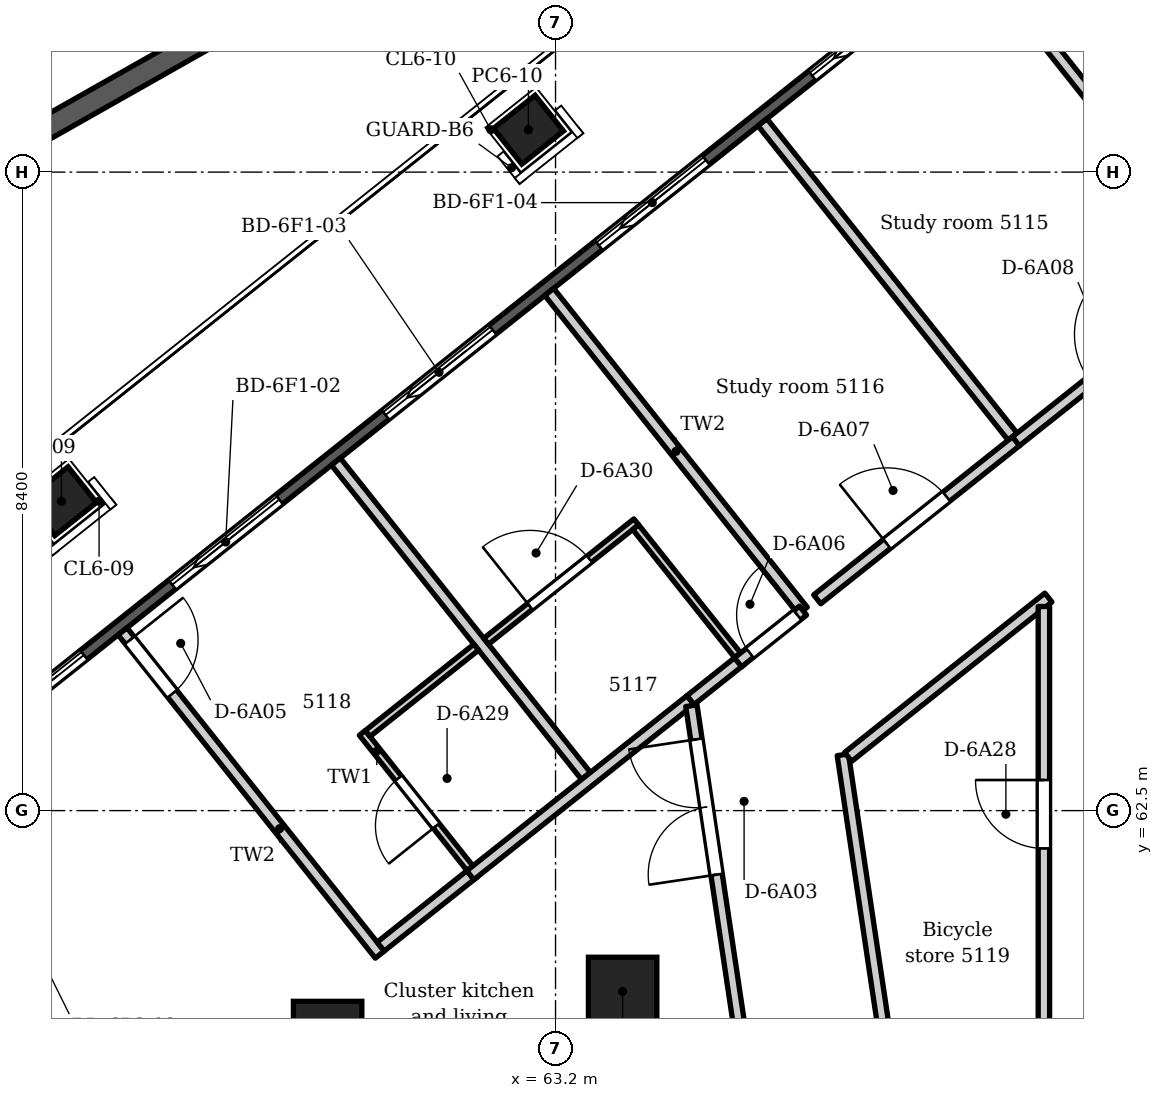
"""IFC4 building model, lengths in metres.
Left out: names, types, materials, properties, quantities, classifications, styles, units other than length and angle.
Written with IfcOpenShell. Run it as: python <this file> out.ifc"""

import sys

from ifc_helpers import new_model, si_unit, direction, frame, frame_2d, origin, origin_2d, place, context, subcontext, project, spatial, polyline, rectangle, circle, outline, extrude, element, fill, save


model = new_model("IFC4")
c1 = context("Model", 3, precision=1e-05, world=origin(), true_north=direction((0.0, 1.0)))
c2 = subcontext(c1, "Body", "Model", "MODEL_VIEW")
j1 = project(units=[si_unit("LENGTHUNIT", "METRE"), si_unit("PLANEANGLEUNIT", "RADIAN")], contexts=[c1])
p1 = place(None, origin())
s1 = spatial("IfcSite", under=j1, at=p1, CompositionType="ELEMENT")
p2 = place(p1, origin())
s2 = spatial("IfcBuilding", under=s1, at=p2, CompositionType="ELEMENT")
p3 = place(p2, frame((0.0, 0.0, 198.0)))
s3 = spatial("IfcBuildingStorey", under=s2, at=p3, CompositionType="ELEMENT", Elevation=198.0)
for number, where, z_axis, x_axis in (
    (1, (56.699, 66.571, -0.35), (0.0, 0.0, 1.0), (0.783, 0.623, 0.0)),
    (2, (62.844, 71.458, -0.35), (0.0, 0.0, 1.0), (0.783, 0.623, 0.0)),
):
    element("IfcColumn", number, at=place(p3, frame(where, z_axis=z_axis, x_axis=x_axis)), inside=s3, PredefinedType="COLUMN", context=c2, shape_type="SweptSolid", body=[
        extrude(rectangle(XDim=0.7, YDim=0.6, at=origin_2d()), origin(), (0.0, 0.0, 1.0), 3.95),
    ])
for number, where, z_axis, x_axis in (
    (3, (64.083, 60.121, -0.35), (0.0, 0.0, 1.0), (1.0, 0.0, 0.0)),
    (4, (60.202, 59.541, -0.35), (0.0, 0.0, 1.0), (1.0, 0.0, 0.0)),
):
    element("IfcColumn", number, at=place(p3, frame(where, z_axis=z_axis, x_axis=x_axis)), inside=s3, PredefinedType="COLUMN", context=c2, shape_type="SweptSolid", body=[
        extrude(circle(Radius=0.45, at=origin_2d()), origin(), (0.0, 0.0, 1.0), 3.95),
    ])
p4 = place(p3, frame((54.651, 62.686, 0.0), z_axis=(0.0, 0.0, 1.0), x_axis=(0.782609620341, 0.622512796776, 0.0)))
e5 = element("IfcWall", 5, at=p4, inside=s3, PredefinedType="SOLIDWALL", context=c2, shape_type="SweptSolid", body=[
    extrude(outline(polyline([(0.149, 0.075), (0.149, -0.075), (39.297, -0.075), (39.297, 0.075), (0.149, 0.075)])), origin(), (0.0, 0.0, 1.0), 3.3),
])
p5 = place(p4, frame((1.193, 0.0, 0.0)))
e6 = element("IfcOpeningElement", 6, at=p5, cuts=e5, PredefinedType="OPENING", context=c2, shape_type="SweptSolid", body=[
    extrude(rectangle(XDim=1.8, YDim=2.6, at=frame_2d((0.9, 1.3))), frame((0.0, 0.085, 0.0), z_axis=(0.0, -1.0, 0.0), x_axis=(1.0, 0.0, 0.0)), (0.0, 0.0, 1.0), 0.17),
])
p6 = place(p4, frame((4.479, 0.0, 0.0)))
e7 = element("IfcOpeningElement", 7, at=p6, cuts=e5, PredefinedType="OPENING", context=c2, shape_type="SweptSolid", body=[
    extrude(rectangle(XDim=1.8, YDim=2.6, at=frame_2d((0.9, 1.3))), frame((0.0, 0.085, 0.0), z_axis=(0.0, -1.0, 0.0), x_axis=(1.0, 0.0, 0.0)), (0.0, 0.0, 1.0), 0.17),
])
p7 = place(p4, frame((8.065, 0.0, 0.0)))
e8 = element("IfcOpeningElement", 8, at=p7, cuts=e5, PredefinedType="OPENING", context=c2, shape_type="SweptSolid", body=[
    extrude(rectangle(XDim=1.8, YDim=2.6, at=frame_2d((0.9, 1.3))), frame((0.0, 0.085, 0.0), z_axis=(0.0, -1.0, 0.0), x_axis=(1.0, 0.0, 0.0)), (0.0, 0.0, 1.0), 0.17),
])
p8 = place(p4, frame((11.651, 0.0, 0.0)))
e9 = element("IfcOpeningElement", 9, at=p8, cuts=e5, PredefinedType="OPENING", context=c2, shape_type="SweptSolid", body=[
    extrude(rectangle(XDim=1.8, YDim=2.6, at=frame_2d((0.9, 1.3))), frame((0.0, 0.085, 0.0), z_axis=(0.0, -1.0, 0.0), x_axis=(1.0, 0.0, 0.0)), (0.0, 0.0, 1.0), 0.17),
])
p9 = place(p4, frame((15.237, 0.0, 0.0)))
e10 = element("IfcOpeningElement", 10, at=p9, cuts=e5, PredefinedType="OPENING", context=c2, shape_type="SweptSolid", body=[
    extrude(rectangle(XDim=1.8, YDim=2.6, at=frame_2d((0.9, 1.3))), frame((0.0, 0.085, 0.0), z_axis=(0.0, -1.0, 0.0), x_axis=(1.0, 0.0, 0.0)), (0.0, 0.0, 1.0), 0.17),
])
p10 = place(p4, frame((18.823, 0.0, 0.0)))
e11 = element("IfcOpeningElement", 11, at=p10, cuts=e5, PredefinedType="OPENING", context=c2, shape_type="SweptSolid", body=[
    extrude(rectangle(XDim=1.8, YDim=2.6, at=frame_2d((0.9, 1.3))), frame((0.0, 0.085, 0.0), z_axis=(0.0, -1.0, 0.0), x_axis=(1.0, 0.0, 0.0)), (0.0, 0.0, 1.0), 0.17),
])
p11 = place(p4, frame((22.409, 0.0, 0.0)))
e12 = element("IfcOpeningElement", 12, at=p11, cuts=e5, PredefinedType="OPENING", context=c2, shape_type="SweptSolid", body=[
    extrude(rectangle(XDim=1.8, YDim=2.6, at=frame_2d((0.9, 1.3))), frame((0.0, 0.085, 0.0), z_axis=(0.0, -1.0, 0.0), x_axis=(1.0, 0.0, 0.0)), (0.0, 0.0, 1.0), 0.17),
])
p12 = place(p4, frame((25.995, 0.0, 0.0)))
e13 = element("IfcOpeningElement", 13, at=p12, cuts=e5, PredefinedType="OPENING", context=c2, shape_type="SweptSolid", body=[
    extrude(rectangle(XDim=1.8, YDim=2.6, at=frame_2d((0.9, 1.3))), frame((0.0, 0.085, 0.0), z_axis=(0.0, -1.0, 0.0), x_axis=(1.0, 0.0, 0.0)), (0.0, 0.0, 1.0), 0.17),
])
p13 = place(p4, frame((29.581, 0.0, 0.0)))
e14 = element("IfcOpeningElement", 14, at=p13, cuts=e5, PredefinedType="OPENING", context=c2, shape_type="SweptSolid", body=[
    extrude(rectangle(XDim=1.8, YDim=2.6, at=frame_2d((0.9, 1.3))), frame((0.0, 0.085, 0.0), z_axis=(0.0, -1.0, 0.0), x_axis=(1.0, 0.0, 0.0)), (0.0, 0.0, 1.0), 0.17),
])
p14 = place(p4, frame((33.167, 0.0, 0.0)))
e15 = element("IfcOpeningElement", 15, at=p14, cuts=e5, PredefinedType="OPENING", context=c2, shape_type="SweptSolid", body=[
    extrude(rectangle(XDim=1.8, YDim=2.6, at=frame_2d((0.9, 1.3))), frame((0.0, 0.085, 0.0), z_axis=(0.0, -1.0, 0.0), x_axis=(1.0, 0.0, 0.0)), (0.0, 0.0, 1.0), 0.17),
])
p15 = place(p4, frame((36.453, 0.0, 0.0)))
e16 = element("IfcOpeningElement", 16, at=p15, cuts=e5, PredefinedType="OPENING", context=c2, shape_type="SweptSolid", body=[
    extrude(rectangle(XDim=1.8, YDim=2.6, at=frame_2d((0.9, 1.3))), frame((0.0, 0.085, 0.0), z_axis=(0.0, -1.0, 0.0), x_axis=(1.0, 0.0, 0.0)), (0.0, 0.0, 1.0), 0.17),
])
p16 = place(p3, frame((56.692, 58.006, 0.0), z_axis=(0.0, 0.0, 1.0), x_axis=(-0.147827081252, 0.989013222383, 0.0)))
e17 = element("IfcWall", 17, at=p16, inside=s3, PredefinedType="SOLIDWALL", context=c2, shape_type="SweptSolid", body=[
    extrude(outline(polyline([(0.0, -0.075), (2.0, -0.075), (2.0, 0.075), (0.0, 0.075), (0.0, -0.075)])), origin(), (0.0, 0.0, 1.0), 3.3),
])
p17 = place(p3, origin())
e18 = element("IfcWall", 18, at=p17, inside=s3, PredefinedType="PARAPET", context=c2, shape_type="SweptSolid", body=[
    extrude(outline(polyline([(75.979, 82.673), (46.956, 66.253), (47.255, 66.077), (74.479, 81.479), (75.979, 82.673)])), origin(), (0.0, 0.0, 1.0), 1.1),
])
p18 = place(p3, frame((57.504, 64.859, 0.0), z_axis=(0.0, 0.0, 1.0), x_axis=(0.622567332104, -0.782566238089, 0.0)))
e19 = element("IfcWall", 19, at=p18, inside=s3, PredefinedType="PARTITIONING", context=c2, shape_type="SweptSolid", body=[
    extrude(rectangle(XDim=5.435, YDim=0.15, at=frame_2d((2.718, 0.0))), origin(), (0.0, 0.0, 1.0), 3.3),
])
p19 = place(p18, frame((0.15, 0.0, 0.0)))
e20 = element("IfcOpeningElement", 20, at=p19, cuts=e19, PredefinedType="OPENING", context=c2, shape_type="SweptSolid", body=[
    extrude(rectangle(XDim=0.9, YDim=2.1, at=frame_2d((0.45, 1.05))), frame((0.0, 0.085, 0.0), z_axis=(0.0, -1.0, 0.0), x_axis=(1.0, 0.0, 0.0)), (0.0, 0.0, 1.0), 0.17),
])
p20 = place(p3, frame((60.31, 67.092, 0.0), z_axis=(0.0, 0.0, 1.0), x_axis=(0.622585933561, -0.782551439416, 0.0)))
e21 = element("IfcWall", 21, at=p20, inside=s3, PredefinedType="PARTITIONING", context=c2, shape_type="SweptSolid", body=[
    extrude(rectangle(XDim=5.285, YDim=0.15, at=frame_2d((2.643, 0.0))), origin(), (0.0, 0.0, 1.0), 3.3),
])
p21 = place(p3, frame((60.658, 63.522, 0.0), z_axis=(0.0, 0.0, 1.0), x_axis=(0.622507134747, -0.782614124067, 0.0)))
e22 = element("IfcWall", 22, at=p21, inside=s3, PredefinedType="PARTITIONING", context=c2, shape_type="SweptSolid", body=[
    extrude(rectangle(XDim=2.275, YDim=0.1, at=frame_2d((1.138, 0.0))), origin(), (0.0, 0.0, 1.0), 3.3),
])
p22 = place(p21, frame((0.763, 0.0, 0.0)))
e23 = element("IfcOpeningElement", 23, at=p22, cuts=e22, PredefinedType="OPENING", context=c2, shape_type="SweptSolid", body=[
    extrude(rectangle(XDim=0.8, YDim=2.1, at=frame_2d((0.4, 1.05))), frame((0.0, 0.06, 0.0), z_axis=(0.0, -1.0, 0.0), x_axis=(1.0, 0.0, 0.0)), (0.0, 0.0, 1.0), 0.12),
])
p23 = place(p3, frame((60.728, 63.514, 0.0), z_axis=(0.0, 0.0, 1.0), x_axis=(0.782562542096, 0.622571977934, 0.0)))
e24 = element("IfcWall", 24, at=p23, inside=s3, PredefinedType="PARTITIONING", context=c2, shape_type="SweptSolid", body=[
    extrude(rectangle(XDim=1.825, YDim=0.1, at=frame_2d((0.913, 0.0))), origin(), (0.0, 0.0, 1.0), 3.3),
])
p24 = place(p3, frame((60.9, 60.711, 0.0), z_axis=(0.0, 0.0, 1.0), x_axis=(0.782464556825, 0.622695123886, 0.0)))
e25 = element("IfcWall", 25, at=p24, inside=s3, PredefinedType="PARTITIONING", context=c2, shape_type="SweptSolid", body=[
    extrude(rectangle(XDim=1.565, YDim=0.15, at=frame_2d((0.782, 0.0))), origin(), (0.0, 0.0, 1.0), 3.3),
])
p25 = place(p3, frame((62.079, 61.65, 0.0), z_axis=(0.0, 0.0, 1.0), x_axis=(0.782654359685, 0.622456547291, 0.0)))
e26 = element("IfcWall", 26, at=p25, inside=s3, PredefinedType="PARTITIONING", context=c2, shape_type="SweptSolid", body=[
    extrude(rectangle(XDim=3.702, YDim=0.15, at=frame_2d((1.851, 0.0))), origin(), (0.0, 0.0, 1.0), 3.3),
])
p26 = place(p3, frame((62.287, 64.728, 0.0), z_axis=(0.0, 0.0, 1.0), x_axis=(0.782639605126, 0.622475098689, 0.0)))
e27 = element("IfcWall", 27, at=p26, inside=s3, PredefinedType="PARTITIONING", context=c2, shape_type="SweptSolid", body=[
    extrude(rectangle(XDim=2.524, YDim=0.1, at=frame_2d((1.262, 0.0))), origin(), (0.0, 0.0, 1.0), 3.3),
])
p27 = place(p26, frame((0.737, 0.0, 0.0)))
e28 = element("IfcOpeningElement", 28, at=p27, cuts=e27, PredefinedType="OPENING", context=c2, shape_type="SweptSolid", body=[
    extrude(rectangle(XDim=1.0, YDim=2.1, at=frame_2d((0.5, 1.05))), frame((0.0, 0.06, 0.0), z_axis=(0.0, -1.0, 0.0), x_axis=(1.0, 0.0, 0.0)), (0.0, 0.0, 1.0), 0.12),
])
p28 = place(p3, frame((63.117, 69.324, 0.0), z_axis=(0.0, 0.0, 1.0), x_axis=(0.622425914019, -0.7826787218, 0.0)))
e29 = element("IfcWall", 29, at=p28, inside=s3, PredefinedType="PARTITIONING", context=c2, shape_type="SweptSolid", body=[
    extrude(rectangle(XDim=5.36, YDim=0.15, at=frame_2d((2.68, 0.0))), origin(), (0.0, 0.0, 1.0), 3.3),
])
p29 = place(p3, frame((64.254, 66.229, 0.0), z_axis=(0.0, 0.0, 1.0), x_axis=(0.622717500652, -0.782446748591, 0.0)))
e30 = element("IfcWall", 30, at=p29, inside=s3, PredefinedType="PARTITIONING", context=c2, shape_type="SweptSolid", body=[
    extrude(rectangle(XDim=2.155, YDim=0.1, at=frame_2d((1.078, 0.0))), origin(), (0.0, 0.0, 1.0), 3.3),
])
p30 = place(p3, frame((64.976, 63.954, 0.0), z_axis=(0.0, 0.0, 1.0), x_axis=(0.78256315963, 0.622571201703, 0.0)))
e31 = element("IfcWall", 31, at=p30, inside=s3, PredefinedType="PARTITIONING", context=c2, shape_type="SweptSolid", body=[
    extrude(rectangle(XDim=0.856, YDim=0.15, at=frame_2d((0.428, 0.0))), origin(), (0.0, 0.0, 1.0), 3.3),
])
p31 = place(p3, frame((64.987, 63.88, 0.0), z_axis=(0.0, 0.0, 1.0), x_axis=(0.147865724858, -0.98900744558, 0.0)))
e32 = element("IfcWall", 32, at=p31, inside=s3, PredefinedType="PARTITIONING", context=c2, shape_type="SweptSolid", body=[
    extrude(rectangle(XDim=7.167, YDim=0.15, at=frame_2d((3.584, 0.0))), origin(), (0.0, 0.0, 1.0), 2.8),
])
p32 = place(p31, frame((0.447, 0.0, 0.0)))
e33 = element("IfcOpeningElement", 33, at=p32, cuts=e32, PredefinedType="OPENING", context=c2, shape_type="SweptSolid", body=[
    extrude(rectangle(XDim=1.8, YDim=2.1, at=frame_2d((0.9, 1.05))), frame((0.0, 0.085, 0.0), z_axis=(0.0, -1.0, 0.0), x_axis=(1.0, 0.0, 0.0)), (0.0, 0.0, 1.0), 0.17),
])
p33 = place(p3, frame((65.601, 64.451, 0.0), z_axis=(0.0, 0.0, 1.0), x_axis=(0.782653002217, 0.622458254119, 0.0)))
e34 = element("IfcWall", 34, at=p33, inside=s3, PredefinedType="PARTITIONING", context=c2, shape_type="SweptSolid", body=[
    extrude(rectangle(XDim=1.093, YDim=0.15, at=frame_2d((0.546, 0.0))), origin(), (0.0, 0.0, 1.0), 3.3),
])
p34 = place(p33, frame((0.198, 0.0, 0.0)))
e35 = element("IfcOpeningElement", 35, at=p34, cuts=e34, PredefinedType="OPENING", context=c2, shape_type="SweptSolid", body=[
    extrude(rectangle(XDim=0.8, YDim=2.1, at=frame_2d((0.4, 1.05))), frame((0.0, 0.085, 0.0), z_axis=(0.0, -1.0, 0.0), x_axis=(1.0, 0.0, 0.0)), (0.0, 0.0, 1.0), 0.17),
])
p35 = place(p3, frame((65.923, 71.556, 0.0), z_axis=(0.0, 0.0, 1.0), x_axis=(0.622585933561, -0.782551439416, 0.0)))
e36 = element("IfcWall", 36, at=p35, inside=s3, PredefinedType="PARTITIONING", context=c2, shape_type="SweptSolid", body=[
    extrude(rectangle(XDim=5.285, YDim=0.15, at=frame_2d((2.643, 0.0))), origin(), (0.0, 0.0, 1.0), 3.3),
])
p36 = place(p3, frame((66.643, 65.28, 0.0), z_axis=(0.0, 0.0, 1.0), x_axis=(0.782743987557, 0.622343835788, 0.0)))
e37 = element("IfcWall", 37, at=p36, inside=s3, PredefinedType="PARTITIONING", context=c2, shape_type="SweptSolid", body=[
    extrude(rectangle(XDim=3.347, YDim=0.15, at=frame_2d((1.673, 0.0))), origin(), (0.0, 0.0, 1.0), 3.3),
])
p37 = place(p36, frame((1.172, 0.0, 0.0)))
e38 = element("IfcOpeningElement", 38, at=p37, cuts=e37, PredefinedType="OPENING", context=c2, shape_type="SweptSolid", body=[
    extrude(rectangle(XDim=1.0, YDim=2.1, at=frame_2d((0.5, 1.05))), frame((0.0, 0.085, 0.0), z_axis=(0.0, -1.0, 0.0), x_axis=(1.0, 0.0, 0.0)), (0.0, 0.0, 1.0), 0.17),
])
p38 = place(p3, frame((66.98, 63.234, 0.0), z_axis=(0.0, 0.0, 1.0), x_axis=(0.14773017043, -0.989027702719, 0.0)))
e39 = element("IfcWall", 39, at=p38, inside=s3, PredefinedType="PARTITIONING", context=c2, shape_type="SweptSolid", body=[
    extrude(rectangle(XDim=5.302, YDim=0.15, at=frame_2d((2.651, 0.0))), origin(), (0.0, 0.0, 1.0), 2.8),
])
p39 = place(p3, frame((67.05, 63.207, 0.0), z_axis=(0.0, 0.0, 1.0), x_axis=(0.782472540885, 0.622685091166, 0.0)))
e40 = element("IfcWall", 40, at=p39, inside=s3, PredefinedType="PARTITIONING", context=c2, shape_type="SweptSolid", body=[
    extrude(rectangle(XDim=3.366, YDim=0.15, at=frame_2d((1.683, 0.0))), origin(), (0.0, 0.0, 1.0), 3.3),
])
p40 = place(p3, frame((68.73, 73.789, 0.0), z_axis=(0.0, 0.0, 1.0), x_axis=(0.622457280045, -0.782653776915, 0.0)))
e41 = element("IfcWall", 41, at=p40, inside=s3, PredefinedType="PARTITIONING", context=c2, shape_type="SweptSolid", body=[
    extrude(rectangle(XDim=5.435, YDim=0.15, at=frame_2d((2.717, 0.0))), origin(), (0.0, 0.0, 1.0), 3.3),
])
p41 = place(p3, frame((69.257, 67.359, 0.0), z_axis=(0.0, 0.0, 1.0), x_axis=(0.782922929563, 0.622118707615, 0.0)))
e42 = element("IfcWall", 42, at=p41, inside=s3, PredefinedType="PARTITIONING", context=c2, shape_type="SweptSolid", body=[
    extrude(rectangle(XDim=3.518, YDim=0.15, at=frame_2d((1.759, 0.0))), origin(), (0.0, 0.0, 1.0), 3.3),
])
p42 = place(p41, frame((1.261, 0.0, 0.0)))
e43 = element("IfcOpeningElement", 43, at=p42, cuts=e42, PredefinedType="OPENING", context=c2, shape_type="SweptSolid", body=[
    extrude(rectangle(XDim=1.0, YDim=2.1, at=frame_2d((0.5, 1.05))), frame((0.0, 0.085, 0.0), z_axis=(0.0, -1.0, 0.0), x_axis=(1.0, 0.0, 0.0)), (0.0, 0.0, 1.0), 0.17),
])
p43 = place(p3, frame((69.625, 59.645, 0.0), z_axis=(0.0, 0.0, 1.0), x_axis=(0.0, 1.0, 0.0)))
e44 = element("IfcWall", 44, at=p43, inside=s3, PredefinedType="PARTITIONING", context=c2, shape_type="SweptSolid", body=[
    extrude(rectangle(XDim=5.54, YDim=0.15, at=frame_2d((2.77, 0.0))), origin(), (0.0, 0.0, 1.0), 2.8),
])
p44 = place(p43, frame((2.357, 0.0, 0.0)))
e45 = element("IfcOpeningElement", 45, at=p44, cuts=e44, PredefinedType="OPENING", context=c2, shape_type="SweptSolid", body=[
    extrude(rectangle(XDim=0.9, YDim=2.1, at=frame_2d((0.45, 1.05))), frame((0.0, 0.085, 0.0), z_axis=(0.0, -1.0, 0.0), x_axis=(1.0, 0.0, 0.0)), (0.0, 0.0, 1.0), 0.17),
])
p45 = place(p5, origin())
e46 = element("IfcDoor", 46, at=p45, inside=s3, OperationType="SLIDING_TO_LEFT", PredefinedType="DOOR", context=c2, shape_type="SweptSolid", body=[
    extrude(rectangle(XDim=1.8, YDim=2.6, at=frame_2d((0.9, 1.3))), frame((0.0, 0.025, 0.0), z_axis=(0.0, -1.0, 0.0), x_axis=(1.0, 0.0, 0.0)), (0.0, 0.0, 1.0), 0.05),
])
fill(e6, e46)
p46 = place(p6, origin())
e47 = element("IfcDoor", 47, at=p46, inside=s3, OperationType="SLIDING_TO_LEFT", PredefinedType="DOOR", context=c2, shape_type="SweptSolid", body=[
    extrude(rectangle(XDim=1.8, YDim=2.6, at=frame_2d((0.9, 1.3))), frame((0.0, 0.025, 0.0), z_axis=(0.0, -1.0, 0.0), x_axis=(1.0, 0.0, 0.0)), (0.0, 0.0, 1.0), 0.05),
])
fill(e7, e47)
p47 = place(p7, origin())
e48 = element("IfcDoor", 48, at=p47, inside=s3, OperationType="SLIDING_TO_LEFT", PredefinedType="DOOR", context=c2, shape_type="SweptSolid", body=[
    extrude(rectangle(XDim=1.8, YDim=2.6, at=frame_2d((0.9, 1.3))), frame((0.0, 0.025, 0.0), z_axis=(0.0, -1.0, 0.0), x_axis=(1.0, 0.0, 0.0)), (0.0, 0.0, 1.0), 0.05),
])
fill(e8, e48)
p48 = place(p8, origin())
e49 = element("IfcDoor", 49, at=p48, inside=s3, OperationType="SLIDING_TO_LEFT", PredefinedType="DOOR", context=c2, shape_type="SweptSolid", body=[
    extrude(rectangle(XDim=1.8, YDim=2.6, at=frame_2d((0.9, 1.3))), frame((0.0, 0.025, 0.0), z_axis=(0.0, -1.0, 0.0), x_axis=(1.0, 0.0, 0.0)), (0.0, 0.0, 1.0), 0.05),
])
fill(e9, e49)
p49 = place(p9, origin())
e50 = element("IfcDoor", 50, at=p49, inside=s3, OperationType="SLIDING_TO_LEFT", PredefinedType="DOOR", context=c2, shape_type="SweptSolid", body=[
    extrude(rectangle(XDim=1.8, YDim=2.6, at=frame_2d((0.9, 1.3))), frame((0.0, 0.025, 0.0), z_axis=(0.0, -1.0, 0.0), x_axis=(1.0, 0.0, 0.0)), (0.0, 0.0, 1.0), 0.05),
])
fill(e10, e50)
p50 = place(p32, frame((1.8, 0.0, 0.0), z_axis=(0.0, 0.0, 1.0), x_axis=(-1.0, 0.0, 0.0)))
e51 = element("IfcDoor", 51, at=p50, inside=s3, OperationType="DOUBLE_DOOR_DOUBLE_SWING", PredefinedType="DOOR", context=c2, shape_type="SweptSolid", body=[
    extrude(rectangle(XDim=1.8, YDim=2.1, at=frame_2d((0.9, 1.05))), frame((0.0, 0.025, 0.0), z_axis=(0.0, -1.0, 0.0), x_axis=(1.0, 0.0, 0.0)), (0.0, 0.0, 1.0), 0.05),
])
fill(e33, e51)
p51 = place(p19, origin())
e52 = element("IfcDoor", 52, at=p51, inside=s3, OperationType="SINGLE_SWING_LEFT", PredefinedType="DOOR", context=c2, shape_type="SweptSolid", body=[
    extrude(rectangle(XDim=0.9, YDim=2.1, at=frame_2d((0.45, 1.05))), frame((0.0, 0.025, 0.0), z_axis=(0.0, -1.0, 0.0), x_axis=(1.0, 0.0, 0.0)), (0.0, 0.0, 1.0), 0.05),
])
fill(e20, e52)
p52 = place(p34, origin())
e53 = element("IfcDoor", 53, at=p52, inside=s3, OperationType="SINGLE_SWING_RIGHT", PredefinedType="DOOR", context=c2, shape_type="SweptSolid", body=[
    extrude(rectangle(XDim=0.8, YDim=2.1, at=frame_2d((0.4, 1.05))), frame((0.0, 0.025, 0.0), z_axis=(0.0, -1.0, 0.0), x_axis=(1.0, 0.0, 0.0)), (0.0, 0.0, 1.0), 0.05),
])
fill(e35, e53)
p53 = place(p37, origin())
e54 = element("IfcDoor", 54, at=p53, inside=s3, OperationType="SINGLE_SWING_LEFT", PredefinedType="DOOR", context=c2, shape_type="SweptSolid", body=[
    extrude(rectangle(XDim=1.0, YDim=2.1, at=frame_2d((0.5, 1.05))), frame((0.0, 0.025, 0.0), z_axis=(0.0, -1.0, 0.0), x_axis=(1.0, 0.0, 0.0)), (0.0, 0.0, 1.0), 0.05),
])
fill(e38, e54)
p54 = place(p44, origin())
e55 = element("IfcDoor", 55, at=p54, inside=s3, OperationType="SINGLE_SWING_RIGHT", PredefinedType="DOOR", context=c2, shape_type="SweptSolid", body=[
    extrude(rectangle(XDim=0.9, YDim=2.1, at=frame_2d((0.45, 1.05))), frame((0.0, 0.025, 0.0), z_axis=(0.0, -1.0, 0.0), x_axis=(1.0, 0.0, 0.0)), (0.0, 0.0, 1.0), 0.05),
])
fill(e45, e55)
p55 = place(p22, frame((0.8, 0.0, 0.0), z_axis=(0.0, 0.0, 1.0), x_axis=(-1.0, 0.0, 0.0)))
e56 = element("IfcDoor", 56, at=p55, inside=s3, OperationType="SINGLE_SWING_LEFT", PredefinedType="DOOR", context=c2, shape_type="SweptSolid", body=[
    extrude(rectangle(XDim=0.8, YDim=2.1, at=frame_2d((0.4, 1.05))), frame((0.0, 0.025, 0.0), z_axis=(0.0, -1.0, 0.0), x_axis=(1.0, 0.0, 0.0)), (0.0, 0.0, 1.0), 0.05),
])
fill(e23, e56)
p56 = place(p27, origin())
e57 = element("IfcDoor", 57, at=p56, inside=s3, OperationType="SINGLE_SWING_LEFT", PredefinedType="DOOR", context=c2, shape_type="SweptSolid", body=[
    extrude(rectangle(XDim=1.0, YDim=2.1, at=frame_2d((0.5, 1.05))), frame((0.0, 0.025, 0.0), z_axis=(0.0, -1.0, 0.0), x_axis=(1.0, 0.0, 0.0)), (0.0, 0.0, 1.0), 0.05),
])
fill(e28, e57)
save(model, sys.argv[1])
